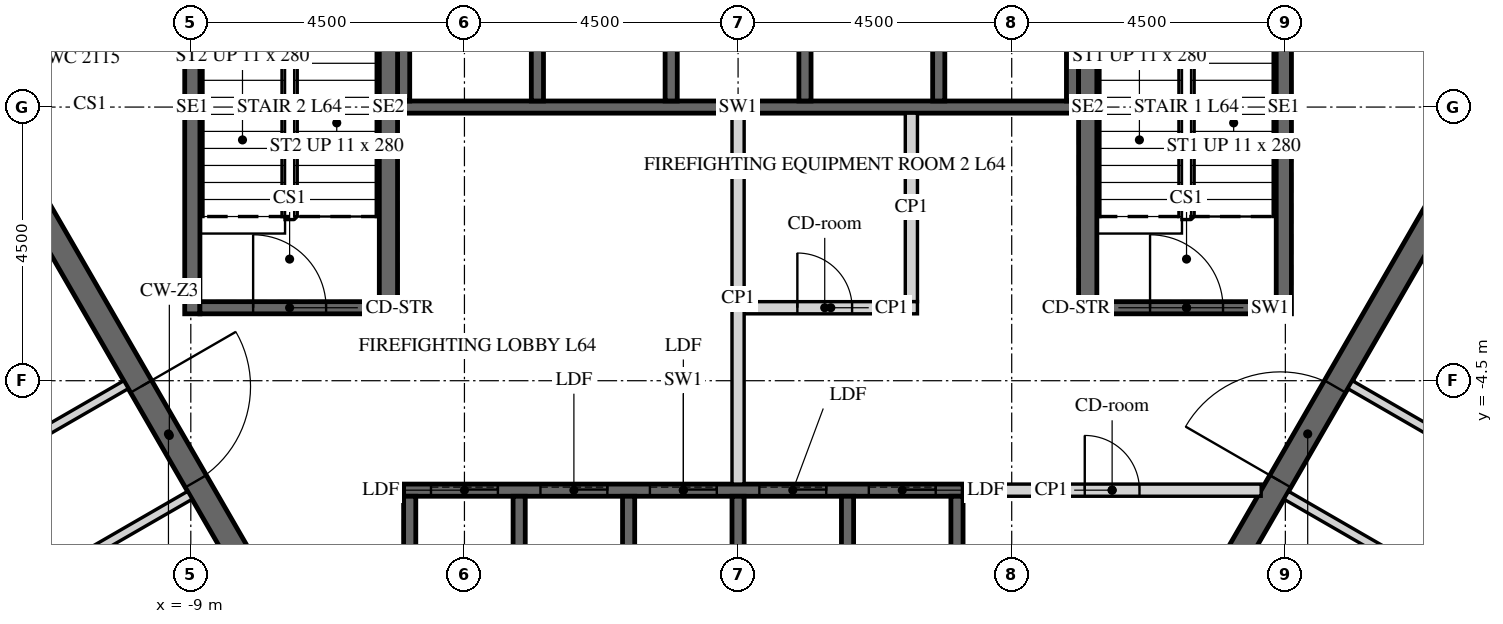
"""IFC4 building model, lengths in metres.
Left out: names, types, materials, properties, quantities, classifications, styles, units other than length and angle.
Written with IfcOpenShell. Run it as: python <this file> out.ifc"""

import sys

from ifc_helpers import new_model, si_unit, direction, frame, frame_2d, origin, place, context, subcontext, project, spatial, polyline, rectangle, outline, extrude, element, fill, save


model = new_model("IFC4")
c1 = context("Model", 3, precision=1e-05, world=origin(), true_north=direction((0.0, 1.0)))
c2 = subcontext(c1, "Body", "Model", "MODEL_VIEW")
j1 = project(units=[si_unit("LENGTHUNIT", "METRE"), si_unit("PLANEANGLEUNIT", "RADIAN")], contexts=[c1])
p1 = place(None, origin())
s1 = spatial("IfcSite", under=j1, at=p1, CompositionType="ELEMENT")
p2 = place(p1, origin())
s2 = spatial("IfcBuilding", under=s1, at=p2, CompositionType="ELEMENT")
p3 = place(p2, frame((0.0, 0.0, 267.9)))
s3 = spatial("IfcBuildingStorey", under=s2, at=p3, CompositionType="ELEMENT", Elevation=267.9)
p4 = place(p3, frame((-6.235, 10.8, -0.15), z_axis=(0.0, 0.0, 1.0), x_axis=(-0.499996419489, -0.866027470984, 0.0)))
e1 = element("IfcWall", 1, at=p4, inside=s3, PredefinedType="SHEAR", context=c2, shape_type="SweptSolid", body=[
    extrude(outline(polyline([(-0.115, -0.2), (12.586, -0.2), (12.355, 0.2), (0.115, 0.2), (-0.115, -0.2)])), origin(), (0.0, 0.0, 1.0), 3.9),
])
p5 = place(p4, frame((5.364, 0.0, 0.15)))
e2 = element("IfcOpeningElement", 2, at=p5, cuts=e1, PredefinedType="OPENING", context=c2, shape_type="SweptSolid", body=[
    extrude(rectangle(XDim=1.8, YDim=2.4, at=frame_2d((0.9, 1.2))), frame((0.0, 0.21, 0.0), z_axis=(0.0, -1.0, 0.0), x_axis=(1.0, 0.0, 0.0)), (0.0, 0.0, 1.0), 0.42),
])
p6 = place(p3, frame((-12.471, 0.0, -0.15), z_axis=(0.0, 0.0, 1.0), x_axis=(0.499996419489, -0.866027470984, 0.0)))
e3 = element("IfcWall", 3, at=p6, inside=s3, PredefinedType="SHEAR", context=c2, shape_type="SweptSolid", body=[
    extrude(outline(polyline([(-0.115, -0.2), (12.586, -0.2), (12.355, 0.2), (0.115, 0.2), (-0.115, -0.2)])), origin(), (0.0, 0.0, 1.0), 3.9),
])
p7 = place(p6, frame((5.306, 0.0, 0.15)))
e4 = element("IfcOpeningElement", 4, at=p7, cuts=e3, PredefinedType="OPENING", context=c2, shape_type="SweptSolid", body=[
    extrude(rectangle(XDim=1.8, YDim=2.4, at=frame_2d((0.9, 1.2))), frame((0.0, 0.21, 0.0), z_axis=(0.0, -1.0, 0.0), x_axis=(1.0, 0.0, 0.0)), (0.0, 0.0, 1.0), 0.42),
])
p8 = place(p3, frame((6.235, -10.8, -0.15), z_axis=(0.0, 0.0, 1.0), x_axis=(0.499996419489, 0.866027470984, 0.0)))
e5 = element("IfcWall", 5, at=p8, inside=s3, PredefinedType="SHEAR", context=c2, shape_type="SweptSolid", body=[
    extrude(outline(polyline([(-0.115, -0.2), (12.586, -0.2), (12.355, 0.2), (0.115, 0.2), (-0.115, -0.2)])), origin(), (0.0, 0.0, 1.0), 3.9),
])
p9 = place(p8, frame((5.364, 0.0, 0.15)))
e6 = element("IfcOpeningElement", 6, at=p9, cuts=e5, PredefinedType="OPENING", context=c2, shape_type="SweptSolid", body=[
    extrude(rectangle(XDim=1.8, YDim=2.4, at=frame_2d((0.9, 1.2))), frame((0.0, 0.21, 0.0), z_axis=(0.0, -1.0, 0.0), x_axis=(1.0, 0.0, 0.0)), (0.0, 0.0, 1.0), 0.42),
])
p10 = place(p3, frame((12.471, 0.0, -0.15), z_axis=(0.0, 0.0, 1.0), x_axis=(-0.499996419489, 0.866027470984, 0.0)))
e7 = element("IfcWall", 7, at=p10, inside=s3, PredefinedType="SHEAR", context=c2, shape_type="SweptSolid", body=[
    extrude(outline(polyline([(-0.115, -0.2), (12.586, -0.2), (12.355, 0.2), (0.115, 0.2), (-0.115, -0.2)])), origin(), (0.0, 0.0, 1.0), 3.9),
])
p11 = place(p10, frame((5.306, 0.0, 0.15)))
e8 = element("IfcOpeningElement", 8, at=p11, cuts=e7, PredefinedType="OPENING", context=c2, shape_type="SweptSolid", body=[
    extrude(rectangle(XDim=1.8, YDim=2.4, at=frame_2d((0.9, 1.2))), frame((0.0, 0.21, 0.0), z_axis=(0.0, -1.0, 0.0), x_axis=(1.0, 0.0, 0.0)), (0.0, 0.0, 1.0), 0.42),
])
p12 = place(p3, frame((-5.6, 0.0, -0.25), z_axis=(0.0, 0.0, 1.0), x_axis=(1.0, 0.0, 0.0)))
e9 = element("IfcWall", 9, at=p12, inside=s3, PredefinedType="SHEAR", context=c2, shape_type="SweptSolid", body=[
    extrude(rectangle(XDim=11.2, YDim=0.2, at=frame_2d((5.6, 0.0))), origin(), (0.0, 0.0, 1.0), 3.9),
])
for number, where, z_axis, x_axis in (
    (10, (-5.5, 0.1, -0.25), (0.0, 0.0, 1.0), (0.0, 1.0, 0.0)),
    (11, (-3.3, 0.1, -0.25), (0.0, 0.0, 1.0), (0.0, 1.0, 0.0)),
    (12, (-1.1, 0.1, -0.25), (0.0, 0.0, 1.0), (0.0, 1.0, 0.0)),
):
    element("IfcWall", number, at=place(p3, frame(where, z_axis=z_axis, x_axis=x_axis)), inside=s3, PredefinedType="SHEAR", context=c2, shape_type="SweptSolid", body=[
        extrude(rectangle(XDim=3.1, YDim=0.2, at=frame_2d((1.55, 0.0))), origin(), (0.0, 0.0, 1.0), 3.9),
    ])
for number, where, z_axis, x_axis in (
    (13, (1.1, 0.1, -0.25), (0.0, 0.0, 1.0), (0.0, 1.0, 0.0)),
    (14, (3.3, 0.1, -0.25), (0.0, 0.0, 1.0), (0.0, 1.0, 0.0)),
):
    element("IfcWall", number, at=place(p3, frame(where, z_axis=z_axis, x_axis=x_axis)), inside=s3, PredefinedType="SHEAR", context=c2, shape_type="SweptSolid", body=[
        extrude(rectangle(XDim=3.3, YDim=0.2, at=frame_2d((1.65, 0.0))), origin(), (0.0, 0.0, 1.0), 3.9),
    ])
p13 = place(p3, frame((5.5, 0.1, -0.25), z_axis=(0.0, 0.0, 1.0), x_axis=(0.0, 1.0, 0.0)))
e15 = element("IfcWall", 15, at=p13, inside=s3, PredefinedType="SHEAR", context=c2, shape_type="SweptSolid", body=[
    extrude(rectangle(XDim=3.1, YDim=0.2, at=frame_2d((1.55, 0.0))), origin(), (0.0, 0.0, 1.0), 3.9),
])
p14 = place(p3, frame((-5.5, -6.3, -0.25), z_axis=(0.0, 0.0, 1.0), x_axis=(1.0, 0.0, 0.0)))
e16 = element("IfcWall", 16, at=p14, inside=s3, PredefinedType="SHEAR", context=c2, shape_type="SweptSolid", body=[
    extrude(rectangle(XDim=9.2, YDim=0.2, at=frame_2d((4.6, 0.0))), origin(), (0.0, 0.0, 1.0), 3.9),
])
p15 = place(p14, frame((0.45, 0.0, 0.25)))
e17 = element("IfcOpeningElement", 17, at=p15, cuts=e16, PredefinedType="OPENING", context=c2, shape_type="SweptSolid", body=[
    extrude(rectangle(XDim=1.1, YDim=2.1, at=frame_2d((0.55, 1.05))), frame((0.0, 0.11, 0.0), z_axis=(0.0, -1.0, 0.0), x_axis=(1.0, 0.0, 0.0)), (0.0, 0.0, 1.0), 0.22),
])
p16 = place(p14, frame((2.25, 0.0, 0.25)))
e18 = element("IfcOpeningElement", 18, at=p16, cuts=e16, PredefinedType="OPENING", context=c2, shape_type="SweptSolid", body=[
    extrude(rectangle(XDim=1.1, YDim=2.1, at=frame_2d((0.55, 1.05))), frame((0.0, 0.11, 0.0), z_axis=(0.0, -1.0, 0.0), x_axis=(1.0, 0.0, 0.0)), (0.0, 0.0, 1.0), 0.22),
])
p17 = place(p14, frame((4.05, 0.0, 0.25)))
e19 = element("IfcOpeningElement", 19, at=p17, cuts=e16, PredefinedType="OPENING", context=c2, shape_type="SweptSolid", body=[
    extrude(rectangle(XDim=1.1, YDim=2.1, at=frame_2d((0.55, 1.05))), frame((0.0, 0.11, 0.0), z_axis=(0.0, -1.0, 0.0), x_axis=(1.0, 0.0, 0.0)), (0.0, 0.0, 1.0), 0.22),
])
p18 = place(p14, frame((5.85, 0.0, 0.25)))
e20 = element("IfcOpeningElement", 20, at=p18, cuts=e16, PredefinedType="OPENING", context=c2, shape_type="SweptSolid", body=[
    extrude(rectangle(XDim=1.1, YDim=2.1, at=frame_2d((0.55, 1.05))), frame((0.0, 0.11, 0.0), z_axis=(0.0, -1.0, 0.0), x_axis=(1.0, 0.0, 0.0)), (0.0, 0.0, 1.0), 0.22),
])
p19 = place(p14, frame((7.65, 0.0, 0.25)))
e21 = element("IfcOpeningElement", 21, at=p19, cuts=e16, PredefinedType="OPENING", context=c2, shape_type="SweptSolid", body=[
    extrude(rectangle(XDim=1.1, YDim=2.1, at=frame_2d((0.55, 1.05))), frame((0.0, 0.11, 0.0), z_axis=(0.0, -1.0, 0.0), x_axis=(1.0, 0.0, 0.0)), (0.0, 0.0, 1.0), 0.22),
])
for number, where, z_axis, x_axis in (
    (22, (-5.4, -9.3, -0.25), (0.0, 0.0, 1.0), (0.0, 1.0, 0.0)),
    (23, (-3.6, -9.3, -0.25), (0.0, 0.0, 1.0), (0.0, 1.0, 0.0)),
    (24, (-1.8, -9.3, -0.25), (0.0, 0.0, 1.0), (0.0, 1.0, 0.0)),
    (25, (0.0, -9.3, -0.25), (0.0, 0.0, 1.0), (0.0, 1.0, 0.0)),
    (26, (1.8, -9.3, -0.25), (0.0, 0.0, 1.0), (0.0, 1.0, 0.0)),
    (27, (3.6, -9.3, -0.25), (0.0, 0.0, 1.0), (0.0, 1.0, 0.0)),
):
    element("IfcWall", number, at=place(p3, frame(where, z_axis=z_axis, x_axis=x_axis)), inside=s3, PredefinedType="SHEAR", context=c2, shape_type="SweptSolid", body=[
        extrude(rectangle(XDim=2.9, YDim=0.2, at=frame_2d((1.45, 0.0))), origin(), (0.0, 0.0, 1.0), 3.9),
    ])
p20 = place(p3, frame((0.1, -3.3, 0.0), z_axis=(0.0, 0.0, 1.0), x_axis=(1.0, 0.0, 0.0)))
e28 = element("IfcWall", 28, at=p20, inside=s3, PredefinedType="PARTITIONING", context=c2, shape_type="SweptSolid", body=[
    extrude(rectangle(XDim=2.85, YDim=0.2, at=frame_2d((1.425, 0.0))), origin(), (0.0, 0.0, 1.0), 3.65),
])
p21 = place(p20, frame((0.875, 0.0, 0.0)))
e29 = element("IfcOpeningElement", 29, at=p21, cuts=e28, PredefinedType="OPENING", context=c2, shape_type="SweptSolid", body=[
    extrude(rectangle(XDim=0.9, YDim=2.1, at=frame_2d((0.45, 1.05))), frame((0.0, 0.11, 0.0), z_axis=(0.0, -1.0, 0.0), x_axis=(1.0, 0.0, 0.0)), (0.0, 0.0, 1.0), 0.22),
])
p22 = place(p3, frame((2.85, -3.2, 0.0), z_axis=(0.0, 0.0, 1.0), x_axis=(0.0, 1.0, 0.0)))
e30 = element("IfcWall", 30, at=p22, inside=s3, PredefinedType="PARTITIONING", context=c2, shape_type="SweptSolid", body=[
    extrude(rectangle(XDim=3.1, YDim=0.2, at=frame_2d((1.55, 0.0))), origin(), (0.0, 0.0, 1.0), 3.65),
])
p23 = place(p3, frame((0.0, -6.2, 0.0), z_axis=(0.0, 0.0, 1.0), x_axis=(0.0, 1.0, 0.0)))
e31 = element("IfcWall", 31, at=p23, inside=s3, PredefinedType="PARTITIONING", context=c2, shape_type="SweptSolid", body=[
    extrude(rectangle(XDim=6.1, YDim=0.2, at=frame_2d((3.05, 0.0))), origin(), (0.0, 0.0, 1.0), 3.65),
])
p24 = place(p3, frame((3.7, -6.3, 0.0), z_axis=(0.0, 0.0, 1.0), x_axis=(1.0, 0.0, 0.0)))
e32 = element("IfcWall", 32, at=p24, inside=s3, PredefinedType="PARTITIONING", context=c2, shape_type="SweptSolid", body=[
    extrude(rectangle(XDim=4.903, YDim=0.2, at=frame_2d((2.451, 0.0))), origin(), (0.0, 0.0, 1.0), 3.65),
])
p25 = place(p24, frame((2.001, 0.0, 0.0)))
e33 = element("IfcOpeningElement", 33, at=p25, cuts=e32, PredefinedType="OPENING", context=c2, shape_type="SweptSolid", body=[
    extrude(rectangle(XDim=0.9, YDim=2.1, at=frame_2d((0.45, 1.05))), frame((0.0, 0.11, 0.0), z_axis=(0.0, -1.0, 0.0), x_axis=(1.0, 0.0, 0.0)), (0.0, 0.0, 1.0), 0.22),
])
p26 = place(p3, frame((5.75, -3.4, -0.25), z_axis=(0.0, 0.0, 1.0), x_axis=(0.0, 1.0, 0.0)))
e34 = element("IfcWall", 34, at=p26, inside=s3, PredefinedType="SHEAR", context=c2, shape_type="SweptSolid", body=[
    extrude(rectangle(XDim=6.8, YDim=0.3, at=frame_2d((3.4, 0.0))), origin(), (0.0, 0.0, 1.0), 3.9),
])
p27 = place(p3, frame((8.975, -3.4, -0.25), z_axis=(0.0, 0.0, 1.0), x_axis=(0.0, 1.0, 0.0)))
e35 = element("IfcWall", 35, at=p27, inside=s3, PredefinedType="SHEAR", context=c2, shape_type="SweptSolid", body=[
    extrude(rectangle(XDim=6.8, YDim=0.25, at=frame_2d((3.4, 0.0))), origin(), (0.0, 0.0, 1.0), 3.9),
])
p28 = place(p3, frame((5.9, -3.3, -0.25), z_axis=(0.0, 0.0, 1.0), x_axis=(1.0, 0.0, 0.0)))
e36 = element("IfcWall", 36, at=p28, inside=s3, PredefinedType="SHEAR", context=c2, shape_type="SweptSolid", body=[
    extrude(rectangle(XDim=2.95, YDim=0.2, at=frame_2d((1.475, 0.0))), origin(), (0.0, 0.0, 1.0), 3.9),
])
p29 = place(p28, frame((0.875, 0.0, 0.25)))
e37 = element("IfcOpeningElement", 37, at=p29, cuts=e36, PredefinedType="OPENING", context=c2, shape_type="SweptSolid", body=[
    extrude(rectangle(XDim=1.2, YDim=2.4, at=frame_2d((0.6, 1.2))), frame((0.0, 0.11, 0.0), z_axis=(0.0, -1.0, 0.0), x_axis=(1.0, 0.0, 0.0)), (0.0, 0.0, 1.0), 0.22),
])
p30 = place(p3, frame((-5.75, -3.4, -0.25), z_axis=(0.0, 0.0, 1.0), x_axis=(0.0, 1.0, 0.0)))
e38 = element("IfcWall", 38, at=p30, inside=s3, PredefinedType="SHEAR", context=c2, shape_type="SweptSolid", body=[
    extrude(rectangle(XDim=6.8, YDim=0.3, at=frame_2d((3.4, 0.0))), origin(), (0.0, 0.0, 1.0), 3.9),
])
p31 = place(p3, frame((-8.975, -3.4, -0.25), z_axis=(0.0, 0.0, 1.0), x_axis=(0.0, 1.0, 0.0)))
e39 = element("IfcWall", 39, at=p31, inside=s3, PredefinedType="SHEAR", context=c2, shape_type="SweptSolid", body=[
    extrude(rectangle(XDim=6.8, YDim=0.25, at=frame_2d((3.4, 0.0))), origin(), (0.0, 0.0, 1.0), 3.9),
])
p32 = place(p3, frame((-8.85, -3.3, -0.25), z_axis=(0.0, 0.0, 1.0), x_axis=(1.0, 0.0, 0.0)))
e40 = element("IfcWall", 40, at=p32, inside=s3, PredefinedType="SHEAR", context=c2, shape_type="SweptSolid", body=[
    extrude(rectangle(XDim=2.95, YDim=0.2, at=frame_2d((1.475, 0.0))), origin(), (0.0, 0.0, 1.0), 3.9),
])
p33 = place(p32, frame((0.875, 0.0, 0.25)))
e41 = element("IfcOpeningElement", 41, at=p33, cuts=e40, PredefinedType="OPENING", context=c2, shape_type="SweptSolid", body=[
    extrude(rectangle(XDim=1.2, YDim=2.4, at=frame_2d((0.6, 1.2))), frame((0.0, 0.11, 0.0), z_axis=(0.0, -1.0, 0.0), x_axis=(1.0, 0.0, 0.0)), (0.0, 0.0, 1.0), 0.22),
])
p34 = place(p3, frame((-17.998, -2.826, 0.0), z_axis=(0.0, 0.0, 1.0), x_axis=(0.500003306199, -0.866023494941, 0.0)))
e42 = element("IfcWall", 42, at=p34, inside=s3, PredefinedType="PARTITIONING", context=c2, shape_type="SweptSolid", body=[
    extrude(rectangle(XDim=14.949, YDim=0.15, at=frame_2d((7.475, 0.0))), origin(), (0.0, 0.0, 1.0), 2.988),
])
p35 = place(p34, frame((2.925, 0.0, 0.0)))
e43 = element("IfcOpeningElement", 43, at=p35, cuts=e42, PredefinedType="OPENING", context=c2, shape_type="SweptSolid", body=[
    extrude(rectangle(XDim=1.0, YDim=2.1, at=frame_2d((0.5, 1.05))), frame((0.0, 0.085, 0.0), z_axis=(0.0, -1.0, 0.0), x_axis=(1.0, 0.0, 0.0)), (0.0, 0.0, 1.0), 0.17),
])
p36 = place(p34, frame((13.799, 0.0, 0.0)))
e44 = element("IfcOpeningElement", 44, at=p36, cuts=e42, PredefinedType="OPENING", context=c2, shape_type="SweptSolid", body=[
    extrude(rectangle(XDim=1.0, YDim=2.1, at=frame_2d((0.5, 1.05))), frame((0.0, 0.085, 0.0), z_axis=(0.0, -1.0, 0.0), x_axis=(1.0, 0.0, 0.0)), (0.0, 0.0, 1.0), 0.17),
])
p37 = place(p3, frame((-10.066, -4.566, 0.0), z_axis=(0.0, 0.0, 1.0), x_axis=(-0.866031096941, -0.499990139034, 0.0)))
e45 = element("IfcWall", 45, at=p37, inside=s3, PredefinedType="PARTITIONING", context=c2, shape_type="SweptSolid", body=[
    extrude(rectangle(XDim=4.5, YDim=0.15, at=frame_2d((2.25, 0.0))), origin(), (0.0, 0.0, 1.0), 2.988),
])
p38 = place(p3, frame((-12.848, -8.597, 0.0), z_axis=(0.0, 0.0, 1.0), x_axis=(0.866017452598, 0.500013771606, 0.0)))
e46 = element("IfcWall", 46, at=p38, inside=s3, PredefinedType="PARTITIONING", context=c2, shape_type="SweptSolid", body=[
    extrude(rectangle(XDim=4.425, YDim=0.15, at=frame_2d((2.213, 0.0))), origin(), (0.0, 0.0, 1.0), 2.988),
])
p39 = place(p3, frame((18.875, -1.158, 0.0), z_axis=(0.0, 0.0, 1.0), x_axis=(-0.55919880344, 0.829033592945, 0.0)))
e47 = element("IfcWall", 47, at=p39, inside=s3, PredefinedType="PARTITIONING", context=c2, shape_type="SweptSolid", body=[
    extrude(rectangle(XDim=16.939, YDim=0.15, at=frame_2d((8.47, 0.0))), origin(), (0.0, 0.0, 1.0), 2.988),
])
p40 = place(p39, frame((9.69, 0.0, 0.0)))
e48 = element("IfcOpeningElement", 48, at=p40, cuts=e47, PredefinedType="OPENING", context=c2, shape_type="SweptSolid", body=[
    extrude(rectangle(XDim=1.0, YDim=2.1, at=frame_2d((0.5, 1.05))), frame((0.0, 0.085, 0.0), z_axis=(0.0, -1.0, 0.0), x_axis=(1.0, 0.0, 0.0)), (0.0, 0.0, 1.0), 0.17),
])
p41 = place(p3, frame((13.898, -6.778, 0.0), z_axis=(0.0, 0.0, 1.0), x_axis=(-0.866041342403, 0.499972392486, 0.0)))
e49 = element("IfcWall", 49, at=p41, inside=s3, PredefinedType="PARTITIONING", context=c2, shape_type="SweptSolid", body=[
    extrude(rectangle(XDim=4.425, YDim=0.15, at=frame_2d((2.212, 0.0))), origin(), (0.0, 0.0, 1.0), 2.988),
])
p42 = place(p3, frame((9.016, -6.384, 0.0), z_axis=(0.0, 0.0, 1.0), x_axis=(0.866031096941, -0.499990139034, 0.0)))
e50 = element("IfcWall", 50, at=p42, inside=s3, PredefinedType="PARTITIONING", context=c2, shape_type="SweptSolid", body=[
    extrude(rectangle(XDim=4.5, YDim=0.15, at=frame_2d((2.25, 0.0))), origin(), (0.0, 0.0, 1.0), 2.988),
])
p43 = place(p7, origin())
e51 = element("IfcDoor", 51, at=p43, inside=s3, OperationType="DOUBLE_DOOR_SINGLE_SWING", PredefinedType="DOOR", context=c2, shape_type="SweptSolid", body=[
    extrude(rectangle(XDim=1.8, YDim=2.4, at=frame_2d((0.9, 1.2))), frame((0.0, 0.025, 0.0), z_axis=(0.0, -1.0, 0.0), x_axis=(1.0, 0.0, 0.0)), (0.0, 0.0, 1.0), 0.05),
])
fill(e4, e51)
p44 = place(p9, origin())
e52 = element("IfcDoor", 52, at=p44, inside=s3, OperationType="DOUBLE_DOOR_SINGLE_SWING", PredefinedType="DOOR", context=c2, shape_type="SweptSolid", body=[
    extrude(rectangle(XDim=1.8, YDim=2.4, at=frame_2d((0.9, 1.2))), frame((0.0, 0.025, 0.0), z_axis=(0.0, -1.0, 0.0), x_axis=(1.0, 0.0, 0.0)), (0.0, 0.0, 1.0), 0.05),
])
fill(e6, e52)
p45 = place(p21, origin())
e53 = element("IfcDoor", 53, at=p45, inside=s3, OperationType="SINGLE_SWING_LEFT", PredefinedType="DOOR", context=c2, shape_type="SweptSolid", body=[
    extrude(rectangle(XDim=0.9, YDim=2.1, at=frame_2d((0.45, 1.05))), frame((0.0, 0.025, 0.0), z_axis=(0.0, -1.0, 0.0), x_axis=(1.0, 0.0, 0.0)), (0.0, 0.0, 1.0), 0.05),
])
fill(e29, e53)
p46 = place(p25, origin())
e54 = element("IfcDoor", 54, at=p46, inside=s3, OperationType="SINGLE_SWING_LEFT", PredefinedType="DOOR", context=c2, shape_type="SweptSolid", body=[
    extrude(rectangle(XDim=0.9, YDim=2.1, at=frame_2d((0.45, 1.05))), frame((0.0, 0.025, 0.0), z_axis=(0.0, -1.0, 0.0), x_axis=(1.0, 0.0, 0.0)), (0.0, 0.0, 1.0), 0.05),
])
fill(e33, e54)
p47 = place(p29, origin())
e55 = element("IfcDoor", 55, at=p47, inside=s3, OperationType="SINGLE_SWING_LEFT", PredefinedType="DOOR", context=c2, shape_type="SweptSolid", body=[
    extrude(rectangle(XDim=1.2, YDim=2.4, at=frame_2d((0.6, 1.2))), frame((0.0, 0.025, 0.0), z_axis=(0.0, -1.0, 0.0), x_axis=(1.0, 0.0, 0.0)), (0.0, 0.0, 1.0), 0.05),
])
fill(e37, e55)
p48 = place(p33, origin())
e56 = element("IfcDoor", 56, at=p48, inside=s3, OperationType="SINGLE_SWING_LEFT", PredefinedType="DOOR", context=c2, shape_type="SweptSolid", body=[
    extrude(rectangle(XDim=1.2, YDim=2.4, at=frame_2d((0.6, 1.2))), frame((0.0, 0.025, 0.0), z_axis=(0.0, -1.0, 0.0), x_axis=(1.0, 0.0, 0.0)), (0.0, 0.0, 1.0), 0.05),
])
fill(e41, e56)
p49 = place(p15, origin())
e57 = element("IfcDoor", 57, at=p49, inside=s3, OperationType="SLIDING_TO_LEFT", PredefinedType="DOOR", context=c2, shape_type="SweptSolid", body=[
    extrude(rectangle(XDim=1.1, YDim=2.1, at=frame_2d((0.55, 1.05))), frame((0.0, 0.025, 0.0), z_axis=(0.0, -1.0, 0.0), x_axis=(1.0, 0.0, 0.0)), (0.0, 0.0, 1.0), 0.05),
])
fill(e17, e57)
p50 = place(p16, origin())
e58 = element("IfcDoor", 58, at=p50, inside=s3, OperationType="SLIDING_TO_LEFT", PredefinedType="DOOR", context=c2, shape_type="SweptSolid", body=[
    extrude(rectangle(XDim=1.1, YDim=2.1, at=frame_2d((0.55, 1.05))), frame((0.0, 0.025, 0.0), z_axis=(0.0, -1.0, 0.0), x_axis=(1.0, 0.0, 0.0)), (0.0, 0.0, 1.0), 0.05),
])
fill(e18, e58)
p51 = place(p17, origin())
e59 = element("IfcDoor", 59, at=p51, inside=s3, OperationType="SLIDING_TO_LEFT", PredefinedType="DOOR", context=c2, shape_type="SweptSolid", body=[
    extrude(rectangle(XDim=1.1, YDim=2.1, at=frame_2d((0.55, 1.05))), frame((0.0, 0.025, 0.0), z_axis=(0.0, -1.0, 0.0), x_axis=(1.0, 0.0, 0.0)), (0.0, 0.0, 1.0), 0.05),
])
fill(e19, e59)
p52 = place(p18, origin())
e60 = element("IfcDoor", 60, at=p52, inside=s3, OperationType="SLIDING_TO_LEFT", PredefinedType="DOOR", context=c2, shape_type="SweptSolid", body=[
    extrude(rectangle(XDim=1.1, YDim=2.1, at=frame_2d((0.55, 1.05))), frame((0.0, 0.025, 0.0), z_axis=(0.0, -1.0, 0.0), x_axis=(1.0, 0.0, 0.0)), (0.0, 0.0, 1.0), 0.05),
])
fill(e20, e60)
p53 = place(p19, origin())
e61 = element("IfcDoor", 61, at=p53, inside=s3, OperationType="SLIDING_TO_LEFT", PredefinedType="DOOR", context=c2, shape_type="SweptSolid", body=[
    extrude(rectangle(XDim=1.1, YDim=2.1, at=frame_2d((0.55, 1.05))), frame((0.0, 0.025, 0.0), z_axis=(0.0, -1.0, 0.0), x_axis=(1.0, 0.0, 0.0)), (0.0, 0.0, 1.0), 0.05),
])
fill(e21, e61)
save(model, sys.argv[1])
